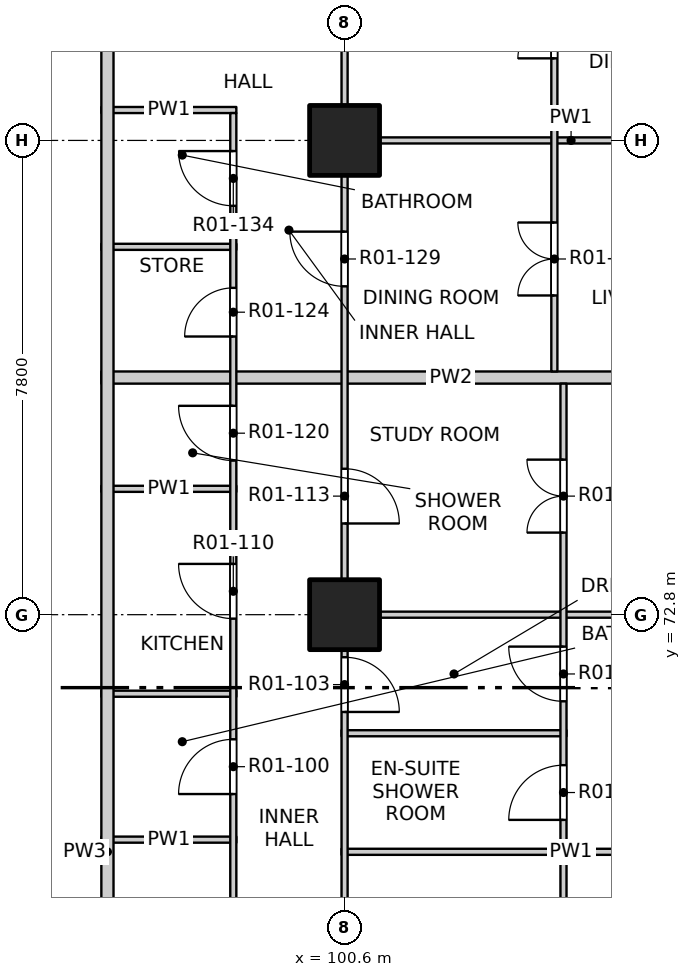
"""IFC4 building model, lengths in metres.
Left out: names, types, materials, properties, quantities, classifications, styles, units other than length and angle.
Written with IfcOpenShell. Run it as: python <this file> out.ifc"""

import sys

from ifc_helpers import new_model, si_unit, direction, frame, frame_2d, origin, origin_2d, place, context, subcontext, project, spatial, rectangle, extrude, element, fill, save


model = new_model("IFC4")
c1 = context("Model", 3, precision=1e-05, world=origin(), true_north=direction((0.0, 1.0)))
c2 = subcontext(c1, "Body", "Model", "MODEL_VIEW")
j1 = project(units=[si_unit("LENGTHUNIT", "METRE"), si_unit("PLANEANGLEUNIT", "RADIAN")], contexts=[c1])
p1 = place(None, origin())
s1 = spatial("IfcSite", under=j1, at=p1, CompositionType="ELEMENT")
p2 = place(p1, origin())
s2 = spatial("IfcBuilding", under=s1, at=p2, CompositionType="ELEMENT")
p3 = place(p2, frame((0.0, 0.0, 26.3)))
s3 = spatial("IfcBuildingStorey", under=s2, at=p3, CompositionType="ELEMENT", Elevation=26.3)
for number, where, z_axis, x_axis in (
    (1, (100.6, 72.8, -0.25), (0.0, 0.0, 1.0), (1.0, 0.0, 0.0)),
    (2, (100.6, 80.6, -0.25), (0.0, 0.0, 1.0), (1.0, 0.0, 0.0)),
):
    element("IfcColumn", number, at=place(p3, frame(where, z_axis=z_axis, x_axis=x_axis)), inside=s3, PredefinedType="COLUMN", context=c2, shape_type="SweptSolid", body=[
        extrude(rectangle(XDim=1.15, YDim=1.15, at=origin_2d()), origin(), (0.0, 0.0, 1.0), 3.4),
    ])
p4 = place(p3, frame((100.55, 68.9, 0.0), z_axis=(0.0, 0.0, 1.0), x_axis=(1.0, 0.0, 0.0)))
e3 = element("IfcWall", 3, at=p4, inside=s3, PredefinedType="PARTITIONING", context=c2, shape_type="SweptSolid", body=[
    extrude(rectangle(XDim=7.55, YDim=0.1, at=frame_2d((3.775, 0.0))), origin(), (0.0, 0.0, 1.0), 3.15),
])
p5 = place(p3, frame((96.6, 69.1, 0.0), z_axis=(0.0, 0.0, 1.0), x_axis=(1.0, 0.0, 0.0)))
e4 = element("IfcWall", 4, at=p5, inside=s3, PredefinedType="PARTITIONING", context=c2, shape_type="SweptSolid", body=[
    extrude(rectangle(XDim=2.22, YDim=0.1, at=frame_2d((1.11, 0.0))), origin(), (0.0, 0.0, 1.0), 3.15),
])
p6 = place(p3, frame((100.55, 70.85, 0.0), z_axis=(0.0, 0.0, 1.0), x_axis=(1.0, 0.0, 0.0)))
e5 = element("IfcWall", 5, at=p6, inside=s3, PredefinedType="PARTITIONING", context=c2, shape_type="SweptSolid", body=[
    extrude(rectangle(XDim=3.7, YDim=0.1, at=frame_2d((1.85, 0.0))), origin(), (0.0, 0.0, 1.0), 3.15),
])
p7 = place(p3, frame((96.6, 71.5, 0.0), z_axis=(0.0, 0.0, 1.0), x_axis=(1.0, 0.0, 0.0)))
e6 = element("IfcWall", 6, at=p7, inside=s3, PredefinedType="PARTITIONING", context=c2, shape_type="SweptSolid", body=[
    extrude(rectangle(XDim=2.22, YDim=0.1, at=frame_2d((1.11, 0.0))), origin(), (0.0, 0.0, 1.0), 3.15),
])
p8 = place(p3, frame((100.55, 72.8, 0.0), z_axis=(0.0, 0.0, 1.0), x_axis=(1.0, 0.0, 0.0)))
e7 = element("IfcWall", 7, at=p8, inside=s3, PredefinedType="PARTITIONING", context=c2, shape_type="SweptSolid", body=[
    extrude(rectangle(XDim=7.55, YDim=0.1, at=frame_2d((3.775, 0.0))), origin(), (0.0, 0.0, 1.0), 2.55),
])
p9 = place(p3, frame((96.6, 74.87, 0.0), z_axis=(0.0, 0.0, 1.0), x_axis=(1.0, 0.0, 0.0)))
e8 = element("IfcWall", 8, at=p9, inside=s3, PredefinedType="PARTITIONING", context=c2, shape_type="SweptSolid", body=[
    extrude(rectangle(XDim=2.22, YDim=0.1, at=frame_2d((1.11, 0.0))), origin(), (0.0, 0.0, 1.0), 3.15),
])
p10 = place(p3, frame((96.6, 76.7, 0.0), z_axis=(0.0, 0.0, 1.0), x_axis=(1.0, 0.0, 0.0)))
e9 = element("IfcWall", 9, at=p10, inside=s3, PredefinedType="PARTITIONING", context=c2, shape_type="SweptSolid", body=[
    extrude(rectangle(XDim=11.5, YDim=0.2, at=frame_2d((5.75, 0.0))), origin(), (0.0, 0.0, 1.0), 3.15),
])
p11 = place(p3, frame((96.6, 78.85, 0.0), z_axis=(0.0, 0.0, 1.0), x_axis=(1.0, 0.0, 0.0)))
e10 = element("IfcWall", 10, at=p11, inside=s3, PredefinedType="PARTITIONING", context=c2, shape_type="SweptSolid", body=[
    extrude(rectangle(XDim=2.22, YDim=0.1, at=frame_2d((1.11, 0.0))), origin(), (0.0, 0.0, 1.0), 3.15),
])
p12 = place(p3, frame((100.55, 80.6, 0.0), z_axis=(0.0, 0.0, 1.0), x_axis=(1.0, 0.0, 0.0)))
e11 = element("IfcWall", 11, at=p12, inside=s3, PredefinedType="PARTITIONING", context=c2, shape_type="SweptSolid", body=[
    extrude(rectangle(XDim=7.55, YDim=0.1, at=frame_2d((3.775, 0.0))), origin(), (0.0, 0.0, 1.0), 2.55),
])
p13 = place(p3, frame((96.6, 81.1, 0.0), z_axis=(0.0, 0.0, 1.0), x_axis=(1.0, 0.0, 0.0)))
e12 = element("IfcWall", 12, at=p13, inside=s3, PredefinedType="PARTITIONING", context=c2, shape_type="SweptSolid", body=[
    extrude(rectangle(XDim=2.22, YDim=0.1, at=frame_2d((1.11, 0.0))), origin(), (0.0, 0.0, 1.0), 3.15),
])
p14 = place(p3, frame((96.7, 53.4, 0.0), z_axis=(0.0, 0.0, 1.0), x_axis=(0.0, 1.0, 0.0)))
e13 = element("IfcWall", 13, at=p14, inside=s3, PredefinedType="PARTITIONING", context=c2, shape_type="SweptSolid", body=[
    extrude(rectangle(XDim=31.0, YDim=0.2, at=frame_2d((15.5, 0.0))), origin(), (0.0, 0.0, 1.0), 3.15),
])
p15 = place(p14, frame((5.575, 0.0, 0.0)))
e14 = element("IfcOpeningElement", 14, at=p15, cuts=e13, PredefinedType="OPENING", context=c2, shape_type="SweptSolid", body=[
    extrude(rectangle(XDim=1.0, YDim=2.1, at=frame_2d((0.5, 1.05))), frame((0.0, 0.11, 0.0), z_axis=(0.0, -1.0, 0.0), x_axis=(1.0, 0.0, 0.0)), (0.0, 0.0, 1.0), 0.22),
])
p16 = place(p14, frame((10.075, 0.0, 0.0)))
e15 = element("IfcOpeningElement", 15, at=p16, cuts=e13, PredefinedType="OPENING", context=c2, shape_type="SweptSolid", body=[
    extrude(rectangle(XDim=1.0, YDim=2.1, at=frame_2d((0.5, 1.05))), frame((0.0, 0.11, 0.0), z_axis=(0.0, -1.0, 0.0), x_axis=(1.0, 0.0, 0.0)), (0.0, 0.0, 1.0), 0.22),
])
p17 = place(p14, frame((28.975, 0.0, 0.0)))
e16 = element("IfcOpeningElement", 16, at=p17, cuts=e13, PredefinedType="OPENING", context=c2, shape_type="SweptSolid", body=[
    extrude(rectangle(XDim=1.0, YDim=2.1, at=frame_2d((0.5, 1.05))), frame((0.0, 0.11, 0.0), z_axis=(0.0, -1.0, 0.0), x_axis=(1.0, 0.0, 0.0)), (0.0, 0.0, 1.0), 0.22),
])
p18 = place(p3, frame((98.77, 63.35, 0.0), z_axis=(0.0, 0.0, 1.0), x_axis=(0.0, 1.0, 0.0)))
e17 = element("IfcWall", 17, at=p18, inside=s3, PredefinedType="PARTITIONING", context=c2, shape_type="SweptSolid", body=[
    extrude(rectangle(XDim=17.7, YDim=0.1, at=frame_2d((8.85, 0.0))), origin(), (0.0, 0.0, 1.0), 3.15),
])
p19 = place(p18, frame((1.0, 0.0, 0.0)))
e18 = element("IfcOpeningElement", 18, at=p19, cuts=e17, PredefinedType="OPENING", context=c2, shape_type="SweptSolid", body=[
    extrude(rectangle(XDim=0.8, YDim=2.1, at=frame_2d((0.4, 1.05))), frame((0.0, 0.06, 0.0), z_axis=(0.0, -1.0, 0.0), x_axis=(1.0, 0.0, 0.0)), (0.0, 0.0, 1.0), 0.12),
])
p20 = place(p18, frame((3.9, 0.0, 0.0)))
e19 = element("IfcOpeningElement", 19, at=p20, cuts=e17, PredefinedType="OPENING", context=c2, shape_type="SweptSolid", body=[
    extrude(rectangle(XDim=0.8, YDim=2.1, at=frame_2d((0.4, 1.05))), frame((0.0, 0.06, 0.0), z_axis=(0.0, -1.0, 0.0), x_axis=(1.0, 0.0, 0.0)), (0.0, 0.0, 1.0), 0.12),
])
p21 = place(p18, frame((6.5, 0.0, 0.0)))
e20 = element("IfcOpeningElement", 20, at=p21, cuts=e17, PredefinedType="OPENING", context=c2, shape_type="SweptSolid", body=[
    extrude(rectangle(XDim=0.9, YDim=2.1, at=frame_2d((0.45, 1.05))), frame((0.0, 0.06, 0.0), z_axis=(0.0, -1.0, 0.0), x_axis=(1.0, 0.0, 0.0)), (0.0, 0.0, 1.0), 0.12),
])
p22 = place(p18, frame((9.385, 0.0, 0.0)))
e21 = element("IfcOpeningElement", 21, at=p22, cuts=e17, PredefinedType="OPENING", context=c2, shape_type="SweptSolid", body=[
    extrude(rectangle(XDim=0.9, YDim=2.1, at=frame_2d((0.45, 1.05))), frame((0.0, 0.06, 0.0), z_axis=(0.0, -1.0, 0.0), x_axis=(1.0, 0.0, 0.0)), (0.0, 0.0, 1.0), 0.12),
])
p23 = place(p18, frame((11.985, 0.0, 0.0)))
e22 = element("IfcOpeningElement", 22, at=p23, cuts=e17, PredefinedType="OPENING", context=c2, shape_type="SweptSolid", body=[
    extrude(rectangle(XDim=0.9, YDim=2.1, at=frame_2d((0.45, 1.05))), frame((0.0, 0.06, 0.0), z_axis=(0.0, -1.0, 0.0), x_axis=(1.0, 0.0, 0.0)), (0.0, 0.0, 1.0), 0.12),
])
p24 = place(p18, frame((14.025, 0.0, 0.0)))
e23 = element("IfcOpeningElement", 23, at=p24, cuts=e17, PredefinedType="OPENING", context=c2, shape_type="SweptSolid", body=[
    extrude(rectangle(XDim=0.8, YDim=2.1, at=frame_2d((0.4, 1.05))), frame((0.0, 0.06, 0.0), z_axis=(0.0, -1.0, 0.0), x_axis=(1.0, 0.0, 0.0)), (0.0, 0.0, 1.0), 0.12),
])
p25 = place(p18, frame((16.175, 0.0, 0.0)))
e24 = element("IfcOpeningElement", 24, at=p25, cuts=e17, PredefinedType="OPENING", context=c2, shape_type="SweptSolid", body=[
    extrude(rectangle(XDim=0.9, YDim=2.1, at=frame_2d((0.45, 1.05))), frame((0.0, 0.06, 0.0), z_axis=(0.0, -1.0, 0.0), x_axis=(1.0, 0.0, 0.0)), (0.0, 0.0, 1.0), 0.12),
])
p26 = place(p3, frame((100.6, 49.4, 0.0), z_axis=(0.0, 0.0, 1.0), x_axis=(0.0, 1.0, 0.0)))
e25 = element("IfcWall", 25, at=p26, inside=s3, PredefinedType="PARTITIONING", context=c2, shape_type="SweptSolid", body=[
    extrude(rectangle(XDim=31.2, YDim=0.1, at=frame_2d((15.6, 0.0))), origin(), (0.0, 0.0, 1.0), 3.15),
])
p27 = place(p26, frame((1.5, 0.0, 0.0)))
e26 = element("IfcOpeningElement", 26, at=p27, cuts=e25, PredefinedType="OPENING", context=c2, shape_type="SweptSolid", body=[
    extrude(rectangle(XDim=0.9, YDim=2.1, at=frame_2d((0.45, 1.05))), frame((0.0, 0.06, 0.0), z_axis=(0.0, -1.0, 0.0), x_axis=(1.0, 0.0, 0.0)), (0.0, 0.0, 1.0), 0.12),
])
p28 = place(p26, frame((5.4, 0.0, 0.0)))
e27 = element("IfcOpeningElement", 27, at=p28, cuts=e25, PredefinedType="OPENING", context=c2, shape_type="SweptSolid", body=[
    extrude(rectangle(XDim=0.9, YDim=2.1, at=frame_2d((0.45, 1.05))), frame((0.0, 0.06, 0.0), z_axis=(0.0, -1.0, 0.0), x_axis=(1.0, 0.0, 0.0)), (0.0, 0.0, 1.0), 0.12),
])
p29 = place(p26, frame((10.275, 0.0, 0.0)))
e28 = element("IfcOpeningElement", 28, at=p29, cuts=e25, PredefinedType="OPENING", context=c2, shape_type="SweptSolid", body=[
    extrude(rectangle(XDim=0.9, YDim=2.1, at=frame_2d((0.45, 1.05))), frame((0.0, 0.06, 0.0), z_axis=(0.0, -1.0, 0.0), x_axis=(1.0, 0.0, 0.0)), (0.0, 0.0, 1.0), 0.12),
])
p30 = place(p26, frame((14.0, 0.0, 0.0)))
e29 = element("IfcOpeningElement", 29, at=p30, cuts=e25, PredefinedType="OPENING", context=c2, shape_type="SweptSolid", body=[
    extrude(rectangle(XDim=0.9, YDim=2.1, at=frame_2d((0.45, 1.05))), frame((0.0, 0.06, 0.0), z_axis=(0.0, -1.0, 0.0), x_axis=(1.0, 0.0, 0.0)), (0.0, 0.0, 1.0), 0.12),
])
p31 = place(p26, frame((17.1, 0.0, 0.0)))
e30 = element("IfcOpeningElement", 30, at=p31, cuts=e25, PredefinedType="OPENING", context=c2, shape_type="SweptSolid", body=[
    extrude(rectangle(XDim=0.9, YDim=2.1, at=frame_2d((0.45, 1.05))), frame((0.0, 0.06, 0.0), z_axis=(0.0, -1.0, 0.0), x_axis=(1.0, 0.0, 0.0)), (0.0, 0.0, 1.0), 0.12),
])
p32 = place(p26, frame((21.8, 0.0, 0.0)))
e31 = element("IfcOpeningElement", 31, at=p32, cuts=e25, PredefinedType="OPENING", context=c2, shape_type="SweptSolid", body=[
    extrude(rectangle(XDim=0.9, YDim=2.1, at=frame_2d((0.45, 1.05))), frame((0.0, 0.06, 0.0), z_axis=(0.0, -1.0, 0.0), x_axis=(1.0, 0.0, 0.0)), (0.0, 0.0, 1.0), 0.12),
])
p33 = place(p26, frame((24.9, 0.0, 0.0)))
e32 = element("IfcOpeningElement", 32, at=p33, cuts=e25, PredefinedType="OPENING", context=c2, shape_type="SweptSolid", body=[
    extrude(rectangle(XDim=0.9, YDim=2.1, at=frame_2d((0.45, 1.05))), frame((0.0, 0.06, 0.0), z_axis=(0.0, -1.0, 0.0), x_axis=(1.0, 0.0, 0.0)), (0.0, 0.0, 1.0), 0.12),
])
p34 = place(p26, frame((28.8, 0.0, 0.0)))
e33 = element("IfcOpeningElement", 33, at=p34, cuts=e25, PredefinedType="OPENING", context=c2, shape_type="SweptSolid", body=[
    extrude(rectangle(XDim=0.9, YDim=2.1, at=frame_2d((0.45, 1.05))), frame((0.0, 0.06, 0.0), z_axis=(0.0, -1.0, 0.0), x_axis=(1.0, 0.0, 0.0)), (0.0, 0.0, 1.0), 0.12),
])
p35 = place(p3, frame((100.6, 80.6, 0.0), z_axis=(0.0, 0.0, 1.0), x_axis=(0.0, 1.0, 0.0)))
e34 = element("IfcWall", 34, at=p35, inside=s3, PredefinedType="PARTITIONING", context=c2, shape_type="SweptSolid", body=[
    extrude(rectangle(XDim=7.5, YDim=0.1, at=frame_2d((3.75, 0.0))), origin(), (0.0, 0.0, 1.0), 2.55),
])
p36 = place(p35, frame((1.5, 0.0, 0.0)))
e35 = element("IfcOpeningElement", 35, at=p36, cuts=e34, PredefinedType="OPENING", context=c2, shape_type="SweptSolid", body=[
    extrude(rectangle(XDim=0.9, YDim=2.1, at=frame_2d((0.45, 1.05))), frame((0.0, 0.06, 0.0), z_axis=(0.0, -1.0, 0.0), x_axis=(1.0, 0.0, 0.0)), (0.0, 0.0, 1.0), 0.12),
])
p37 = place(p35, frame((5.4, 0.0, 0.0)))
e36 = element("IfcOpeningElement", 36, at=p37, cuts=e34, PredefinedType="OPENING", context=c2, shape_type="SweptSolid", body=[
    extrude(rectangle(XDim=0.9, YDim=2.1, at=frame_2d((0.45, 1.05))), frame((0.0, 0.06, 0.0), z_axis=(0.0, -1.0, 0.0), x_axis=(1.0, 0.0, 0.0)), (0.0, 0.0, 1.0), 0.12),
])
p38 = place(p3, frame((104.05, 76.8, 0.0), z_axis=(0.0, 0.0, 1.0), x_axis=(0.0, 1.0, 0.0)))
e37 = element("IfcWall", 37, at=p38, inside=s3, PredefinedType="PARTITIONING", context=c2, shape_type="SweptSolid", body=[
    extrude(rectangle(XDim=11.3, YDim=0.1, at=frame_2d((5.65, 0.0))), origin(), (0.0, 0.0, 1.0), 3.15),
])
p39 = place(p38, frame((1.25, 0.0, 0.0)))
e38 = element("IfcOpeningElement", 38, at=p39, cuts=e37, PredefinedType="OPENING", context=c2, shape_type="SweptSolid", body=[
    extrude(rectangle(XDim=1.2, YDim=2.1, at=frame_2d((0.6, 1.05))), frame((0.0, 0.06, 0.0), z_axis=(0.0, -1.0, 0.0), x_axis=(1.0, 0.0, 0.0)), (0.0, 0.0, 1.0), 0.12),
])
p40 = place(p38, frame((5.15, 0.0, 0.0)))
e39 = element("IfcOpeningElement", 39, at=p40, cuts=e37, PredefinedType="OPENING", context=c2, shape_type="SweptSolid", body=[
    extrude(rectangle(XDim=1.2, YDim=2.1, at=frame_2d((0.6, 1.05))), frame((0.0, 0.06, 0.0), z_axis=(0.0, -1.0, 0.0), x_axis=(1.0, 0.0, 0.0)), (0.0, 0.0, 1.0), 0.12),
])
p41 = place(p38, frame((9.05, 0.0, 0.0)))
e40 = element("IfcOpeningElement", 40, at=p41, cuts=e37, PredefinedType="OPENING", context=c2, shape_type="SweptSolid", body=[
    extrude(rectangle(XDim=1.2, YDim=2.1, at=frame_2d((0.6, 1.05))), frame((0.0, 0.06, 0.0), z_axis=(0.0, -1.0, 0.0), x_axis=(1.0, 0.0, 0.0)), (0.0, 0.0, 1.0), 0.12),
])
p42 = place(p3, frame((104.2, 61.2, 0.0), z_axis=(0.0, 0.0, 1.0), x_axis=(0.0, 1.0, 0.0)))
e41 = element("IfcWall", 41, at=p42, inside=s3, PredefinedType="PARTITIONING", context=c2, shape_type="SweptSolid", body=[
    extrude(rectangle(XDim=15.4, YDim=0.1, at=frame_2d((7.7, 0.0))), origin(), (0.0, 0.0, 1.0), 3.15),
])
p43 = place(p42, frame((0.425, 0.0, 0.0)))
e42 = element("IfcOpeningElement", 42, at=p43, cuts=e41, PredefinedType="OPENING", context=c2, shape_type="SweptSolid", body=[
    extrude(rectangle(XDim=0.9, YDim=2.1, at=frame_2d((0.45, 1.05))), frame((0.0, 0.06, 0.0), z_axis=(0.0, -1.0, 0.0), x_axis=(1.0, 0.0, 0.0)), (0.0, 0.0, 1.0), 0.12),
])
p44 = place(p42, frame((2.375, 0.0, 0.0)))
e43 = element("IfcOpeningElement", 43, at=p44, cuts=e41, PredefinedType="OPENING", context=c2, shape_type="SweptSolid", body=[
    extrude(rectangle(XDim=0.9, YDim=2.1, at=frame_2d((0.45, 1.05))), frame((0.0, 0.06, 0.0), z_axis=(0.0, -1.0, 0.0), x_axis=(1.0, 0.0, 0.0)), (0.0, 0.0, 1.0), 0.12),
])
p45 = place(p42, frame((5.15, 0.0, 0.0)))
e44 = element("IfcOpeningElement", 44, at=p45, cuts=e41, PredefinedType="OPENING", context=c2, shape_type="SweptSolid", body=[
    extrude(rectangle(XDim=1.2, YDim=2.1, at=frame_2d((0.6, 1.05))), frame((0.0, 0.06, 0.0), z_axis=(0.0, -1.0, 0.0), x_axis=(1.0, 0.0, 0.0)), (0.0, 0.0, 1.0), 0.12),
])
p46 = place(p42, frame((8.225, 0.0, 0.0)))
e45 = element("IfcOpeningElement", 45, at=p46, cuts=e41, PredefinedType="OPENING", context=c2, shape_type="SweptSolid", body=[
    extrude(rectangle(XDim=0.9, YDim=2.1, at=frame_2d((0.45, 1.05))), frame((0.0, 0.06, 0.0), z_axis=(0.0, -1.0, 0.0), x_axis=(1.0, 0.0, 0.0)), (0.0, 0.0, 1.0), 0.12),
])
p47 = place(p42, frame((10.175, 0.0, 0.0)))
e46 = element("IfcOpeningElement", 46, at=p47, cuts=e41, PredefinedType="OPENING", context=c2, shape_type="SweptSolid", body=[
    extrude(rectangle(XDim=0.9, YDim=2.1, at=frame_2d((0.45, 1.05))), frame((0.0, 0.06, 0.0), z_axis=(0.0, -1.0, 0.0), x_axis=(1.0, 0.0, 0.0)), (0.0, 0.0, 1.0), 0.12),
])
p48 = place(p42, frame((12.95, 0.0, 0.0)))
e47 = element("IfcOpeningElement", 47, at=p48, cuts=e41, PredefinedType="OPENING", context=c2, shape_type="SweptSolid", body=[
    extrude(rectangle(XDim=1.2, YDim=2.1, at=frame_2d((0.6, 1.05))), frame((0.0, 0.06, 0.0), z_axis=(0.0, -1.0, 0.0), x_axis=(1.0, 0.0, 0.0)), (0.0, 0.0, 1.0), 0.12),
])
p49 = place(p46, origin())
e48 = element("IfcDoor", 48, at=p49, inside=s3, OperationType="SINGLE_SWING_LEFT", PredefinedType="DOOR", context=c2, shape_type="SweptSolid", body=[
    extrude(rectangle(XDim=0.9, YDim=2.1, at=frame_2d((0.45, 1.05))), frame((0.0, 0.025, 0.0), z_axis=(0.0, -1.0, 0.0), x_axis=(1.0, 0.0, 0.0)), (0.0, 0.0, 1.0), 0.05),
])
fill(e45, e48)
p50 = place(p21, origin())
e49 = element("IfcDoor", 49, at=p50, inside=s3, OperationType="SINGLE_SWING_LEFT", PredefinedType="DOOR", context=c2, shape_type="SweptSolid", body=[
    extrude(rectangle(XDim=0.9, YDim=2.1, at=frame_2d((0.45, 1.05))), frame((0.0, 0.025, 0.0), z_axis=(0.0, -1.0, 0.0), x_axis=(1.0, 0.0, 0.0)), (0.0, 0.0, 1.0), 0.05),
])
fill(e20, e49)
p51 = place(p32, origin())
e50 = element("IfcDoor", 50, at=p51, inside=s3, OperationType="SINGLE_SWING_RIGHT", PredefinedType="DOOR", context=c2, shape_type="SweptSolid", body=[
    extrude(rectangle(XDim=0.9, YDim=2.1, at=frame_2d((0.45, 1.05))), frame((0.0, 0.025, 0.0), z_axis=(0.0, -1.0, 0.0), x_axis=(1.0, 0.0, 0.0)), (0.0, 0.0, 1.0), 0.05),
])
fill(e31, e50)
p52 = place(p47, origin())
e51 = element("IfcDoor", 51, at=p52, inside=s3, OperationType="SINGLE_SWING_RIGHT", PredefinedType="DOOR", context=c2, shape_type="SweptSolid", body=[
    extrude(rectangle(XDim=0.9, YDim=2.1, at=frame_2d((0.45, 1.05))), frame((0.0, 0.025, 0.0), z_axis=(0.0, -1.0, 0.0), x_axis=(1.0, 0.0, 0.0)), (0.0, 0.0, 1.0), 0.05),
])
fill(e46, e51)
p53 = place(p22, origin())
e52 = element("IfcDoor", 52, at=p53, inside=s3, OperationType="SINGLE_SWING_RIGHT", PredefinedType="DOOR", context=c2, shape_type="SweptSolid", body=[
    extrude(rectangle(XDim=0.9, YDim=2.1, at=frame_2d((0.45, 1.05))), frame((0.0, 0.025, 0.0), z_axis=(0.0, -1.0, 0.0), x_axis=(1.0, 0.0, 0.0)), (0.0, 0.0, 1.0), 0.05),
])
fill(e21, e52)
p54 = place(p33, origin())
e53 = element("IfcDoor", 53, at=p54, inside=s3, OperationType="SINGLE_SWING_RIGHT", PredefinedType="DOOR", context=c2, shape_type="SweptSolid", body=[
    extrude(rectangle(XDim=0.9, YDim=2.1, at=frame_2d((0.45, 1.05))), frame((0.0, 0.025, 0.0), z_axis=(0.0, -1.0, 0.0), x_axis=(1.0, 0.0, 0.0)), (0.0, 0.0, 1.0), 0.05),
])
fill(e32, e53)
p55 = place(p48, origin())
e54 = element("IfcDoor", 54, at=p55, inside=s3, OperationType="DOUBLE_DOOR_SINGLE_SWING", PredefinedType="DOOR", context=c2, shape_type="SweptSolid", body=[
    extrude(rectangle(XDim=1.2, YDim=2.1, at=frame_2d((0.6, 1.05))), frame((0.0, 0.025, 0.0), z_axis=(0.0, -1.0, 0.0), x_axis=(1.0, 0.0, 0.0)), (0.0, 0.0, 1.0), 0.05),
])
fill(e47, e54)
p56 = place(p23, origin())
e55 = element("IfcDoor", 55, at=p56, inside=s3, OperationType="SINGLE_SWING_RIGHT", PredefinedType="DOOR", context=c2, shape_type="SweptSolid", body=[
    extrude(rectangle(XDim=0.9, YDim=2.1, at=frame_2d((0.45, 1.05))), frame((0.0, 0.025, 0.0), z_axis=(0.0, -1.0, 0.0), x_axis=(1.0, 0.0, 0.0)), (0.0, 0.0, 1.0), 0.05),
])
fill(e22, e55)
p57 = place(p24, origin())
e56 = element("IfcDoor", 56, at=p57, inside=s3, OperationType="SINGLE_SWING_LEFT", PredefinedType="DOOR", context=c2, shape_type="SweptSolid", body=[
    extrude(rectangle(XDim=0.8, YDim=2.1, at=frame_2d((0.4, 1.05))), frame((0.0, 0.025, 0.0), z_axis=(0.0, -1.0, 0.0), x_axis=(1.0, 0.0, 0.0)), (0.0, 0.0, 1.0), 0.05),
])
fill(e23, e56)
p58 = place(p34, origin())
e57 = element("IfcDoor", 57, at=p58, inside=s3, OperationType="SINGLE_SWING_RIGHT", PredefinedType="DOOR", context=c2, shape_type="SweptSolid", body=[
    extrude(rectangle(XDim=0.9, YDim=2.1, at=frame_2d((0.45, 1.05))), frame((0.0, 0.025, 0.0), z_axis=(0.0, -1.0, 0.0), x_axis=(1.0, 0.0, 0.0)), (0.0, 0.0, 1.0), 0.05),
])
fill(e33, e57)
p59 = place(p39, origin())
e58 = element("IfcDoor", 58, at=p59, inside=s3, OperationType="DOUBLE_DOOR_SINGLE_SWING", PredefinedType="DOOR", context=c2, shape_type="SweptSolid", body=[
    extrude(rectangle(XDim=1.2, YDim=2.1, at=frame_2d((0.6, 1.05))), frame((0.0, 0.025, 0.0), z_axis=(0.0, -1.0, 0.0), x_axis=(1.0, 0.0, 0.0)), (0.0, 0.0, 1.0), 0.05),
])
fill(e38, e58)
p60 = place(p25, origin())
e59 = element("IfcDoor", 59, at=p60, inside=s3, OperationType="SINGLE_SWING_RIGHT", PredefinedType="DOOR", context=c2, shape_type="SweptSolid", body=[
    extrude(rectangle(XDim=0.9, YDim=2.1, at=frame_2d((0.45, 1.05))), frame((0.0, 0.025, 0.0), z_axis=(0.0, -1.0, 0.0), x_axis=(1.0, 0.0, 0.0)), (0.0, 0.0, 1.0), 0.05),
])
fill(e24, e59)
p61 = place(p40, origin())
e60 = element("IfcDoor", 60, at=p61, inside=s3, OperationType="DOUBLE_DOOR_SINGLE_SWING", PredefinedType="DOOR", context=c2, shape_type="SweptSolid", body=[
    extrude(rectangle(XDim=1.2, YDim=2.1, at=frame_2d((0.6, 1.05))), frame((0.0, 0.025, 0.0), z_axis=(0.0, -1.0, 0.0), x_axis=(1.0, 0.0, 0.0)), (0.0, 0.0, 1.0), 0.05),
])
fill(e39, e60)
save(model, sys.argv[1])
